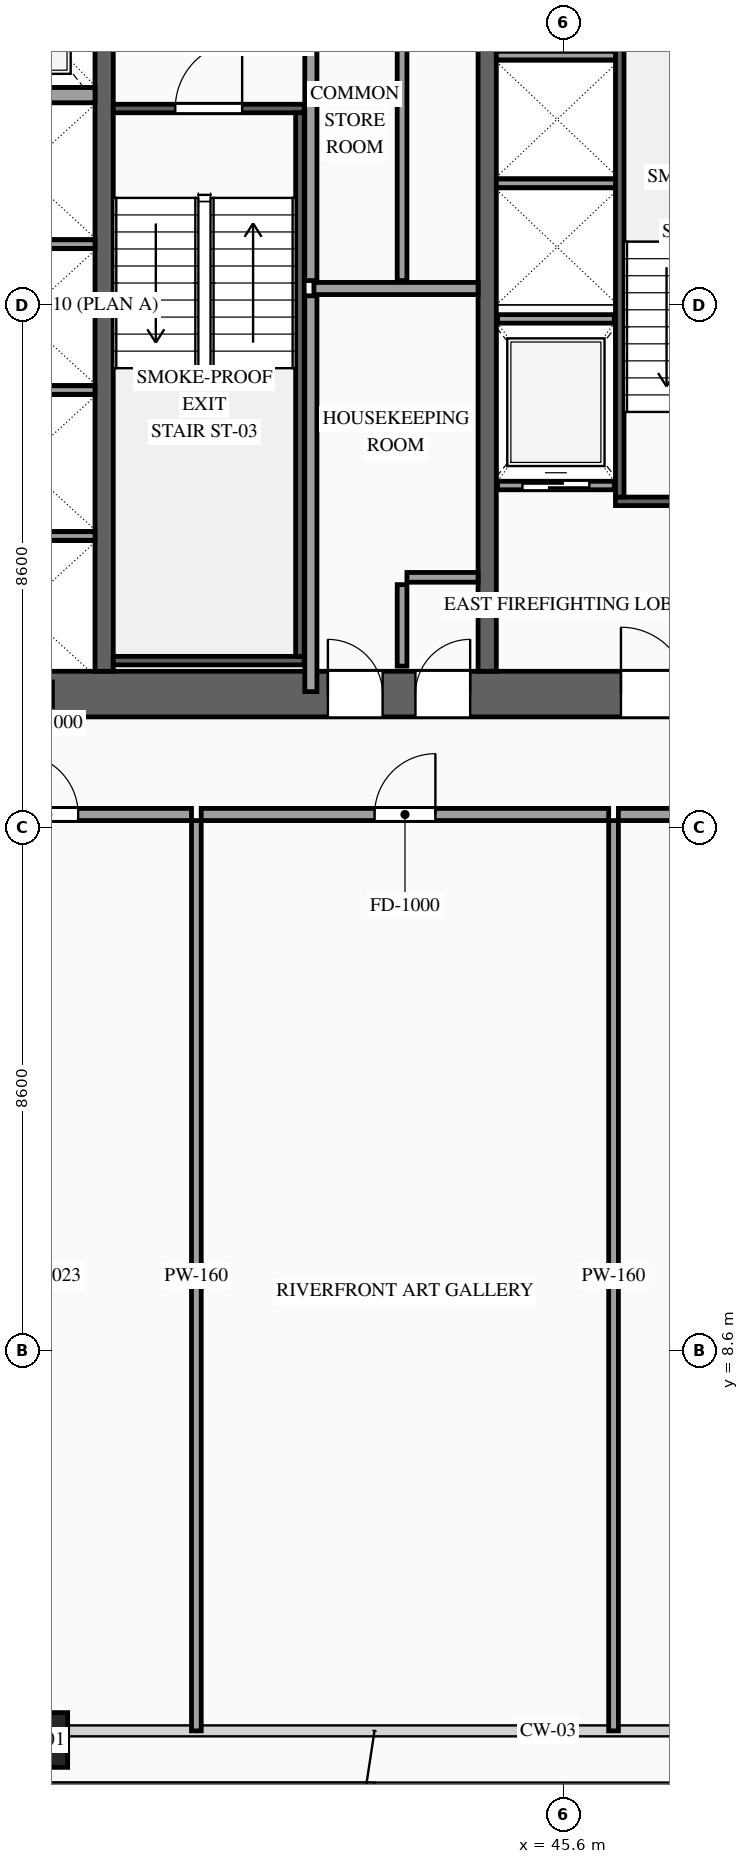
"""IFC4 building model, lengths in metres.
Left out: names, types, materials, properties, quantities, classifications, styles, units other than length and angle.
Written with IfcOpenShell. Run it as: python <this file> out.ifc"""

import sys

from ifc_helpers import new_model, si_unit, direction, frame, frame_2d, origin, origin_2d, place, context, subcontext, project, spatial, rectangle, hollow_rectangle, extrude, source, transform, mapped, element, fill, save


model = new_model("IFC4")
c1 = context("Model", 3, precision=1e-05, world=origin(), true_north=direction((0.0, 1.0)))
c2 = subcontext(c1, "Body", "Model", "MODEL_VIEW")
j1 = project(units=[si_unit("LENGTHUNIT", "METRE"), si_unit("PLANEANGLEUNIT", "RADIAN")], contexts=[c1])
p1 = place(None, origin())
s1 = spatial("IfcSite", under=j1, at=p1, CompositionType="ELEMENT")
p2 = place(p1, origin())
s2 = spatial("IfcBuilding", under=s1, at=p2, CompositionType="ELEMENT")
p3 = place(p2, frame((0.0, 0.0, 159.6)))
s3 = spatial("IfcBuildingStorey", under=s2, at=p3, CompositionType="ELEMENT", Elevation=159.6)
p4 = place(p3, frame((23.425, 19.4, 0.0), z_axis=(0.0, 0.0, 1.0), x_axis=(1.0, 0.0, 0.0)))
e1 = element("IfcWall", 1, at=p4, inside=s3, PredefinedType="SHEAR", context=c2, shape_type="SweptSolid", body=[
    extrude(rectangle(XDim=27.15, YDim=0.75, at=frame_2d((13.575, 0.0))), origin(), (0.0, 0.0, 1.0), 3.6),
])
p5 = place(p4, frame((2.025, 0.0, 0.0)))
e2 = element("IfcOpeningElement", 2, at=p5, cuts=e1, PredefinedType="OPENING", context=c2, shape_type="SweptSolid", body=[
    extrude(rectangle(XDim=1.1, YDim=2.2, at=frame_2d((0.55, 1.1))), frame((0.0, 0.39, 0.0), z_axis=(0.0, -1.0, 0.0), x_axis=(1.0, 0.0, 0.0)), (0.0, 0.0, 1.0), 0.78),
])
p6 = place(p4, frame((9.925, 0.0, 0.0)))
e3 = element("IfcOpeningElement", 3, at=p6, cuts=e1, PredefinedType="OPENING", context=c2, shape_type="SweptSolid", body=[
    extrude(rectangle(XDim=1.1, YDim=2.2, at=frame_2d((0.55, 1.1))), frame((0.0, 0.39, 0.0), z_axis=(0.0, -1.0, 0.0), x_axis=(1.0, 0.0, 0.0)), (0.0, 0.0, 1.0), 0.78),
])
p7 = place(p4, frame((23.125, 0.0, 0.0)))
e4 = element("IfcOpeningElement", 4, at=p7, cuts=e1, PredefinedType="OPENING", context=c2, shape_type="SweptSolid", body=[
    extrude(rectangle(XDim=1.1, YDim=2.2, at=frame_2d((0.55, 1.1))), frame((0.0, 0.39, 0.0), z_axis=(0.0, -1.0, 0.0), x_axis=(1.0, 0.0, 0.0)), (0.0, 0.0, 1.0), 0.78),
])
p8 = place(p4, frame((19.745, 0.0, 0.0)))
e5 = element("IfcOpeningElement", 5, at=p8, cuts=e1, PredefinedType="OPENING", context=c2, shape_type="SweptSolid", body=[
    extrude(rectangle(XDim=0.9, YDim=2.15, at=frame_2d((0.45, 1.075))), frame((0.0, 0.39, 0.0), z_axis=(0.0, -1.0, 0.0), x_axis=(1.0, 0.0, 0.0)), (0.0, 0.0, 1.0), 0.78),
])
p9 = place(p4, frame((18.305, 0.0, 0.0)))
e6 = element("IfcOpeningElement", 6, at=p9, cuts=e1, PredefinedType="OPENING", context=c2, shape_type="SweptSolid", body=[
    extrude(rectangle(XDim=0.9, YDim=2.15, at=frame_2d((0.45, 1.075))), frame((0.0, 0.39, 0.0), z_axis=(0.0, -1.0, 0.0), x_axis=(1.0, 0.0, 0.0)), (0.0, 0.0, 1.0), 0.78),
])
m1 = source(origin(), c2, "Body", "SweptSolid", [
    extrude(rectangle(XDim=12.05, YDim=0.3, at=frame_2d((6.025, 0.0))), origin(), (0.0, 0.0, 1.0), 3.6),
])
for number, where, z_axis, x_axis in (
    (7, (38.05, 19.775, 0.0), (0.0, 0.0, 1.0), (0.0, 1.0, 0.0)),
    (8, (44.35, 19.775, 0.0), (0.0, 0.0, 1.0), (0.0, 1.0, 0.0)),
):
    element("IfcWall", number, at=place(p3, frame(where, z_axis=z_axis, x_axis=x_axis)), inside=s3, PredefinedType="SOLIDWALL", context=c2, shape_type="MappedRepresentation", body=[
        mapped(m1, transform((0.0, 0.0, 0.0), scale=1.0)),
    ])
m2 = source(origin(), c2, "Body", "SweptSolid", [
    extrude(hollow_rectangle(XDim=0.9, YDim=0.9, WallThickness=0.042, at=origin_2d()), origin(), (0.0, 0.0, 1.0), 3.6),
])
p10 = place(p3, frame((37.0, 2.2, 0.0), z_axis=(0.0, 0.0, 1.0), x_axis=(1.0, 0.0, 0.0)))
e9 = element("IfcColumn", 9, at=p10, inside=s3, PredefinedType="COLUMN", context=c2, shape_type="MappedRepresentation", body=[
    mapped(m2, transform((0.0, 0.0, 0.0), scale=1.0)),
])
p11 = place(p3, frame((44.52, 22.83, 0.0), z_axis=(0.0, 0.0, 1.0), x_axis=(1.0, 0.0, 0.0)))
e10 = element("IfcWall", 10, at=p11, inside=s3, PredefinedType="SOLIDWALL", context=c2, shape_type="SweptSolid", body=[
    extrude(rectangle(XDim=1.92, YDim=0.14, at=frame_2d((0.96, 0.0))), origin(), (0.0, 0.0, 1.0), 3.38),
])
p12 = place(p11, frame((0.41, 0.0, 0.0)))
e11 = element("IfcOpeningElement", 11, at=p12, cuts=e10, PredefinedType="OPENING", context=c2, shape_type="SweptSolid", body=[
    extrude(rectangle(XDim=1.1, YDim=2.2, at=frame_2d((0.55, 1.1))), frame((0.0, 0.085, 0.0), z_axis=(0.0, -1.0, 0.0), x_axis=(1.0, 0.0, 0.0)), (0.0, 0.0, 1.0), 0.17),
])
m3 = source(origin(), c2, "Body", "SweptSolid", [
    extrude(rectangle(XDim=1.92, YDim=0.14, at=frame_2d((0.96, 0.0))), origin(), (0.0, 0.0, 1.0), 3.38),
])
p13 = place(p3, frame((44.52, 25.57, 0.0), z_axis=(0.0, 0.0, 1.0), x_axis=(1.0, 0.0, 0.0)))
e12 = element("IfcWall", 12, at=p13, inside=s3, PredefinedType="SOLIDWALL", context=c2, shape_type="MappedRepresentation", body=[
    mapped(m3, transform((0.0, 0.0, 0.0), scale=1.0)),
])
m4 = source(origin(), c2, "Body", "SweptSolid", [
    extrude(rectangle(XDim=2.4, YDim=0.14, at=frame_2d((1.2, 0.0))), origin(), (0.0, 0.0, 1.0), 3.38),
])
for number, where, z_axis, x_axis in (
    (13, (35.5, 22.0, 0.0), (0.0, 0.0, 1.0), (1.0, 0.0, 0.0)),
    (14, (35.5, 24.4, 0.0), (0.0, 0.0, 1.0), (1.0, 0.0, 0.0)),
    (15, (35.5, 26.8, 0.0), (0.0, 0.0, 1.0), (1.0, 0.0, 0.0)),
):
    element("IfcWall", number, at=place(p3, frame(where, z_axis=z_axis, x_axis=x_axis)), inside=s3, PredefinedType="SOLIDWALL", context=c2, shape_type="MappedRepresentation", body=[
        mapped(m4, transform((0.0, 0.0, 0.0), scale=1.0)),
    ])
m5 = source(origin(), c2, "Body", "SweptSolid", [
    extrude(rectangle(XDim=2.4, YDim=0.25, at=frame_2d((1.2, 0.0))), origin(), (0.0, 0.0, 1.0), 3.38),
])
p14 = place(p3, frame((35.5, 29.25, 0.0), z_axis=(0.0, 0.0, 1.0), x_axis=(1.0, 0.0, 0.0)))
e16 = element("IfcWall", 16, at=p14, inside=s3, PredefinedType="SOLIDWALL", context=c2, shape_type="MappedRepresentation", body=[
    mapped(m5, transform((0.0, 0.0, 0.0), scale=1.0)),
])
m6 = source(origin(), c2, "Body", "SweptSolid", [
    extrude(rectangle(XDim=2.0, YDim=0.14, at=frame_2d((1.0, 0.0))), origin(), (0.0, 0.0, 1.0), 3.38),
])
for number, where, z_axis, x_axis in (
    (17, (44.5, 27.8, 0.0), (0.0, 0.0, 1.0), (1.0, 0.0, 0.0)),
    (18, (44.5, 29.9, 0.0), (0.0, 0.0, 1.0), (1.0, 0.0, 0.0)),
):
    element("IfcWall", number, at=place(p3, frame(where, z_axis=z_axis, x_axis=x_axis)), inside=s3, PredefinedType="SOLIDWALL", context=c2, shape_type="MappedRepresentation", body=[
        mapped(m6, transform((0.0, 0.0, 0.0), scale=1.0)),
    ])
p15 = place(p3, frame((46.46, 22.57, 0.0), z_axis=(0.0, 0.0, 1.0), x_axis=(1.0, 0.0, 0.0)))
e19 = element("IfcWall", 19, at=p15, inside=s3, PredefinedType="SOLIDWALL", context=c2, shape_type="SweptSolid", body=[
    extrude(rectangle(XDim=3.28, YDim=0.14, at=frame_2d((1.64, 0.0))), origin(), (0.0, 0.0, 1.0), 3.38),
])
p16 = place(p15, frame((1.09, 0.0, 0.0)))
e20 = element("IfcOpeningElement", 20, at=p16, cuts=e19, PredefinedType="OPENING", context=c2, shape_type="SweptSolid", body=[
    extrude(rectangle(XDim=1.1, YDim=2.2, at=frame_2d((0.55, 1.1))), frame((0.0, 0.085, 0.0), z_axis=(0.0, -1.0, 0.0), x_axis=(1.0, 0.0, 0.0)), (0.0, 0.0, 1.0), 0.17),
])
m7 = source(origin(), c2, "Body", "SweptSolid", [
    extrude(rectangle(XDim=8.94, YDim=0.14, at=frame_2d((4.47, 0.0))), origin(), (0.0, 0.0, 1.0), 3.38),
])
p17 = place(p3, frame((46.53, 22.64, 0.0), z_axis=(0.0, 0.0, 1.0), x_axis=(0.0, 1.0, 0.0)))
e21 = element("IfcWall", 21, at=p17, inside=s3, PredefinedType="SOLIDWALL", context=c2, shape_type="MappedRepresentation", body=[
    mapped(m7, transform((0.0, 0.0, 0.0), scale=1.0)),
])
p18 = place(p3, frame((38.2, 29.03, 0.0), z_axis=(0.0, 0.0, 1.0), x_axis=(1.0, 0.0, 0.0)))
e22 = element("IfcWall", 22, at=p18, inside=s3, PredefinedType="SOLIDWALL", context=c2, shape_type="SweptSolid", body=[
    extrude(rectangle(XDim=3.14, YDim=0.14, at=frame_2d((1.57, 0.0))), origin(), (0.0, 0.0, 1.0), 3.38),
])
p19 = place(p18, frame((1.02, 0.0, 0.0)))
e23 = element("IfcOpeningElement", 23, at=p19, cuts=e22, PredefinedType="OPENING", context=c2, shape_type="SweptSolid", body=[
    extrude(rectangle(XDim=1.1, YDim=2.2, at=frame_2d((0.55, 1.1))), frame((0.0, 0.085, 0.0), z_axis=(0.0, -1.0, 0.0), x_axis=(1.0, 0.0, 0.0)), (0.0, 0.0, 1.0), 0.17),
])
m8 = source(origin(), c2, "Body", "SweptSolid", [
    extrude(rectangle(XDim=3.14, YDim=0.14, at=frame_2d((1.57, 0.0))), origin(), (0.0, 0.0, 1.0), 3.38),
])
p20 = place(p3, frame((38.2, 19.95, 0.0), z_axis=(0.0, 0.0, 1.0), x_axis=(1.0, 0.0, 0.0)))
e24 = element("IfcWall", 24, at=p20, inside=s3, PredefinedType="SOLIDWALL", context=c2, shape_type="MappedRepresentation", body=[
    mapped(m8, transform((0.0, 0.0, 0.0), scale=1.0)),
])
m9 = source(origin(), c2, "Body", "SweptSolid", [
    extrude(rectangle(XDim=8.94, YDim=0.14, at=frame_2d((4.47, 0.0))), origin(), (0.0, 0.0, 1.0), 3.38),
])
p21 = place(p3, frame((41.27, 20.02, 0.0), z_axis=(0.0, 0.0, 1.0), x_axis=(0.0, 1.0, 0.0)))
e25 = element("IfcWall", 25, at=p21, inside=s3, PredefinedType="SOLIDWALL", context=c2, shape_type="MappedRepresentation", body=[
    mapped(m9, transform((0.0, 0.0, 0.0), scale=1.0)),
])
m10 = source(origin(), c2, "Body", "SweptSolid", [
    extrude(rectangle(XDim=1.34, YDim=0.16, at=frame_2d((0.67, 0.0))), origin(), (0.0, 0.0, 1.0), 3.38),
])
p22 = place(p3, frame((42.95, 19.86, 0.0), z_axis=(0.0, 0.0, 1.0), x_axis=(0.0, 1.0, 0.0)))
e26 = element("IfcWall", 26, at=p22, inside=s3, PredefinedType="PARTITIONING", context=c2, shape_type="MappedRepresentation", body=[
    mapped(m10, transform((0.0, 0.0, 0.0), scale=1.0)),
])
m11 = source(origin(), c2, "Body", "SweptSolid", [
    extrude(rectangle(XDim=1.17, YDim=0.16, at=frame_2d((0.585, 0.0))), origin(), (0.0, 0.0, 1.0), 3.38),
])
p23 = place(p3, frame((43.03, 21.32, 0.0), z_axis=(0.0, 0.0, 1.0), x_axis=(1.0, 0.0, 0.0)))
e27 = element("IfcWall", 27, at=p23, inside=s3, PredefinedType="PARTITIONING", context=c2, shape_type="MappedRepresentation", body=[
    mapped(m11, transform((0.0, 0.0, 0.0), scale=1.0)),
])
m12 = source(origin(), c2, "Body", "SweptSolid", [
    extrude(rectangle(XDim=6.51, YDim=0.2, at=frame_2d((3.255, 0.0))), origin(), (0.0, 0.0, 1.0), 3.38),
])
p24 = place(p3, frame((41.45, 19.44, 0.0), z_axis=(0.0, 0.0, 1.0), x_axis=(0.0, 1.0, 0.0)))
e28 = element("IfcWall", 28, at=p24, inside=s3, PredefinedType="PARTITIONING", context=c2, shape_type="MappedRepresentation", body=[
    mapped(m12, transform((0.0, 0.0, 0.0), scale=1.0)),
])
m13 = source(origin(), c2, "Body", "SweptSolid", [
    extrude(rectangle(XDim=2.7, YDim=0.2, at=frame_2d((1.35, 0.0))), origin(), (0.0, 0.0, 1.0), 3.38),
])
p25 = place(p3, frame((41.5, 26.07, 0.0), z_axis=(0.0, 0.0, 1.0), x_axis=(1.0, 0.0, 0.0)))
e29 = element("IfcWall", 29, at=p25, inside=s3, PredefinedType="PARTITIONING", context=c2, shape_type="MappedRepresentation", body=[
    mapped(m13, transform((0.0, 0.0, 0.0), scale=1.0)),
])
m14 = source(origin(), c2, "Body", "SweptSolid", [
    extrude(rectangle(XDim=5.96, YDim=0.2, at=frame_2d((2.98, 0.0))), origin(), (0.0, 0.0, 1.0), 3.38),
])
p26 = place(p3, frame((41.45, 26.2, 0.0), z_axis=(0.0, 0.0, 1.0), x_axis=(0.0, 1.0, 0.0)))
e30 = element("IfcWall", 30, at=p26, inside=s3, PredefinedType="PARTITIONING", context=c2, shape_type="MappedRepresentation", body=[
    mapped(m14, transform((0.0, 0.0, 0.0), scale=1.0)),
])
m15 = source(origin(), c2, "Body", "SweptSolid", [
    extrude(rectangle(XDim=5.96, YDim=0.16, at=frame_2d((2.98, 0.0))), origin(), (0.0, 0.0, 1.0), 3.38),
])
p27 = place(p3, frame((42.95, 26.2, 0.0), z_axis=(0.0, 0.0, 1.0), x_axis=(0.0, 1.0, 0.0)))
e31 = element("IfcWall", 31, at=p27, inside=s3, PredefinedType="PARTITIONING", context=c2, shape_type="MappedRepresentation", body=[
    mapped(m15, transform((0.0, 0.0, 0.0), scale=1.0)),
])
p28 = place(p3, frame((34.76, 17.42, 0.0), z_axis=(0.0, 0.0, 1.0), x_axis=(1.0, 0.0, 0.0)))
e32 = element("IfcWall", 32, at=p28, inside=s3, PredefinedType="PARTITIONING", context=c2, shape_type="SweptSolid", body=[
    extrude(rectangle(XDim=4.727, YDim=0.2, at=frame_2d((2.364, 0.0))), origin(), (0.0, 0.0, 1.0), 3.38),
])
p29 = place(p28, frame((1.863, 0.0, 0.0)))
e33 = element("IfcOpeningElement", 33, at=p29, cuts=e32, PredefinedType="OPENING", context=c2, shape_type="SweptSolid", body=[
    extrude(rectangle(XDim=1.0, YDim=2.2, at=frame_2d((0.5, 1.1))), frame((0.0, 0.115, 0.0), z_axis=(0.0, -1.0, 0.0), x_axis=(1.0, 0.0, 0.0)), (0.0, 0.0, 1.0), 0.23),
])
m16 = source(origin(), c2, "Body", "SweptSolid", [
    extrude(rectangle(XDim=14.97, YDim=0.16, at=frame_2d((7.485, 0.0))), origin(), (0.0, 0.0, 1.0), 3.38),
])
p30 = place(p3, frame((39.567, 2.35, 0.0), z_axis=(0.0, 0.0, 1.0), x_axis=(0.0, 1.0, 0.0)))
e34 = element("IfcWall", 34, at=p30, inside=s3, PredefinedType="PARTITIONING", context=c2, shape_type="MappedRepresentation", body=[
    mapped(m16, transform((0.0, 0.0, 0.0), scale=1.0)),
])
p31 = place(p3, frame((39.647, 17.42, 0.0), z_axis=(0.0, 0.0, 1.0), x_axis=(1.0, 0.0, 0.0)))
e35 = element("IfcWall", 35, at=p31, inside=s3, PredefinedType="PARTITIONING", context=c2, shape_type="SweptSolid", body=[
    extrude(rectangle(XDim=6.701, YDim=0.2, at=frame_2d((3.351, 0.0))), origin(), (0.0, 0.0, 1.0), 3.38),
])
p32 = place(p31, frame((2.851, 0.0, 0.0)))
e36 = element("IfcOpeningElement", 36, at=p32, cuts=e35, PredefinedType="OPENING", context=c2, shape_type="SweptSolid", body=[
    extrude(rectangle(XDim=1.0, YDim=2.2, at=frame_2d((0.5, 1.1))), frame((0.0, 0.115, 0.0), z_axis=(0.0, -1.0, 0.0), x_axis=(1.0, 0.0, 0.0)), (0.0, 0.0, 1.0), 0.23),
])
p33 = place(p3, frame((46.428, 2.35, 0.0), z_axis=(0.0, 0.0, 1.0), x_axis=(0.0, 1.0, 0.0)))
e37 = element("IfcWall", 37, at=p33, inside=s3, PredefinedType="PARTITIONING", context=c2, shape_type="MappedRepresentation", body=[
    mapped(m16, transform((0.0, 0.0, 0.0), scale=1.0)),
])
p34 = place(p3, frame((46.508, 17.42, 0.0), z_axis=(0.0, 0.0, 1.0), x_axis=(1.0, 0.0, 0.0)))
e38 = element("IfcWall", 38, at=p34, inside=s3, PredefinedType="PARTITIONING", context=c2, shape_type="SweptSolid", body=[
    extrude(rectangle(XDim=4.728, YDim=0.2, at=frame_2d((2.364, 0.0))), origin(), (0.0, 0.0, 1.0), 3.38),
])
p35 = place(p34, frame((1.864, 0.0, 0.0)))
e39 = element("IfcOpeningElement", 39, at=p35, cuts=e38, PredefinedType="OPENING", context=c2, shape_type="SweptSolid", body=[
    extrude(rectangle(XDim=1.0, YDim=2.2, at=frame_2d((0.5, 1.1))), frame((0.0, 0.115, 0.0), z_axis=(0.0, -1.0, 0.0), x_axis=(1.0, 0.0, 0.0)), (0.0, 0.0, 1.0), 0.23),
])
m17 = source(origin(), c2, "Body", "SweptSolid", [
    extrude(rectangle(XDim=1.1, YDim=2.2, at=frame_2d((0.55, 1.1))), frame((0.0, 0.025, 0.0), z_axis=(0.0, -1.0, 0.0), x_axis=(1.0, 0.0, 0.0)), (0.0, 0.0, 1.0), 0.05),
])
p36 = place(p12, origin())
e40 = element("IfcDoor", 40, at=p36, inside=s3, OperationType="SLIDING_TO_RIGHT", PredefinedType="DOOR", context=c2, shape_type="MappedRepresentation", body=[
    mapped(m17, transform((0.0, 0.0, 0.0), scale=1.0)),
])
fill(e11, e40)
m18 = source(origin(), c2, "Body", "SweptSolid", [
    extrude(rectangle(XDim=1.1, YDim=2.2, at=frame_2d((0.55, 1.1))), frame((0.0, 0.025, 0.0), z_axis=(0.0, -1.0, 0.0), x_axis=(1.0, 0.0, 0.0)), (0.0, 0.0, 1.0), 0.05),
])
p37 = place(p19, origin())
e41 = element("IfcDoor", 41, at=p37, inside=s3, OperationType="SINGLE_SWING_RIGHT", PredefinedType="DOOR", context=c2, shape_type="MappedRepresentation", body=[
    mapped(m18, transform((0.0, 0.0, 0.0), scale=1.0)),
])
fill(e23, e41)
p38 = place(p7, origin())
e42 = element("IfcDoor", 42, at=p38, inside=s3, OperationType="SINGLE_SWING_LEFT", PredefinedType="DOOR", context=c2, shape_type="MappedRepresentation", body=[
    mapped(m18, transform((0.0, 0.0, 0.0), scale=1.0)),
])
fill(e4, e42)
m19 = source(origin(), c2, "Body", "SweptSolid", [
    extrude(rectangle(XDim=0.9, YDim=2.15, at=frame_2d((0.45, 1.075))), frame((0.0, 0.025, 0.0), z_axis=(0.0, -1.0, 0.0), x_axis=(1.0, 0.0, 0.0)), (0.0, 0.0, 1.0), 0.05),
])
p39 = place(p8, origin())
e43 = element("IfcDoor", 43, at=p39, inside=s3, OperationType="SINGLE_SWING_RIGHT", PredefinedType="DOOR", context=c2, shape_type="MappedRepresentation", body=[
    mapped(m19, transform((0.0, 0.0, 0.0), scale=1.0)),
])
fill(e5, e43)
p40 = place(p9, origin())
e44 = element("IfcDoor", 44, at=p40, inside=s3, OperationType="SINGLE_SWING_LEFT", PredefinedType="DOOR", context=c2, shape_type="MappedRepresentation", body=[
    mapped(m19, transform((0.0, 0.0, 0.0), scale=1.0)),
])
fill(e6, e44)
m20 = source(origin(), c2, "Body", "SweptSolid", [
    extrude(rectangle(XDim=1.0, YDim=2.2, at=frame_2d((0.5, 1.1))), frame((0.0, 0.025, 0.0), z_axis=(0.0, -1.0, 0.0), x_axis=(1.0, 0.0, 0.0)), (0.0, 0.0, 1.0), 0.05),
])
p41 = place(p29, origin())
e45 = element("IfcDoor", 45, at=p41, inside=s3, OperationType="SINGLE_SWING_LEFT", PredefinedType="DOOR", context=c2, shape_type="MappedRepresentation", body=[
    mapped(m20, transform((0.0, 0.0, 0.0), scale=1.0)),
])
fill(e33, e45)
p42 = place(p32, origin())
e46 = element("IfcDoor", 46, at=p42, inside=s3, OperationType="SINGLE_SWING_RIGHT", PredefinedType="DOOR", context=c2, shape_type="MappedRepresentation", body=[
    mapped(m20, transform((0.0, 0.0, 0.0), scale=1.0)),
])
fill(e36, e46)
save(model, sys.argv[1])
